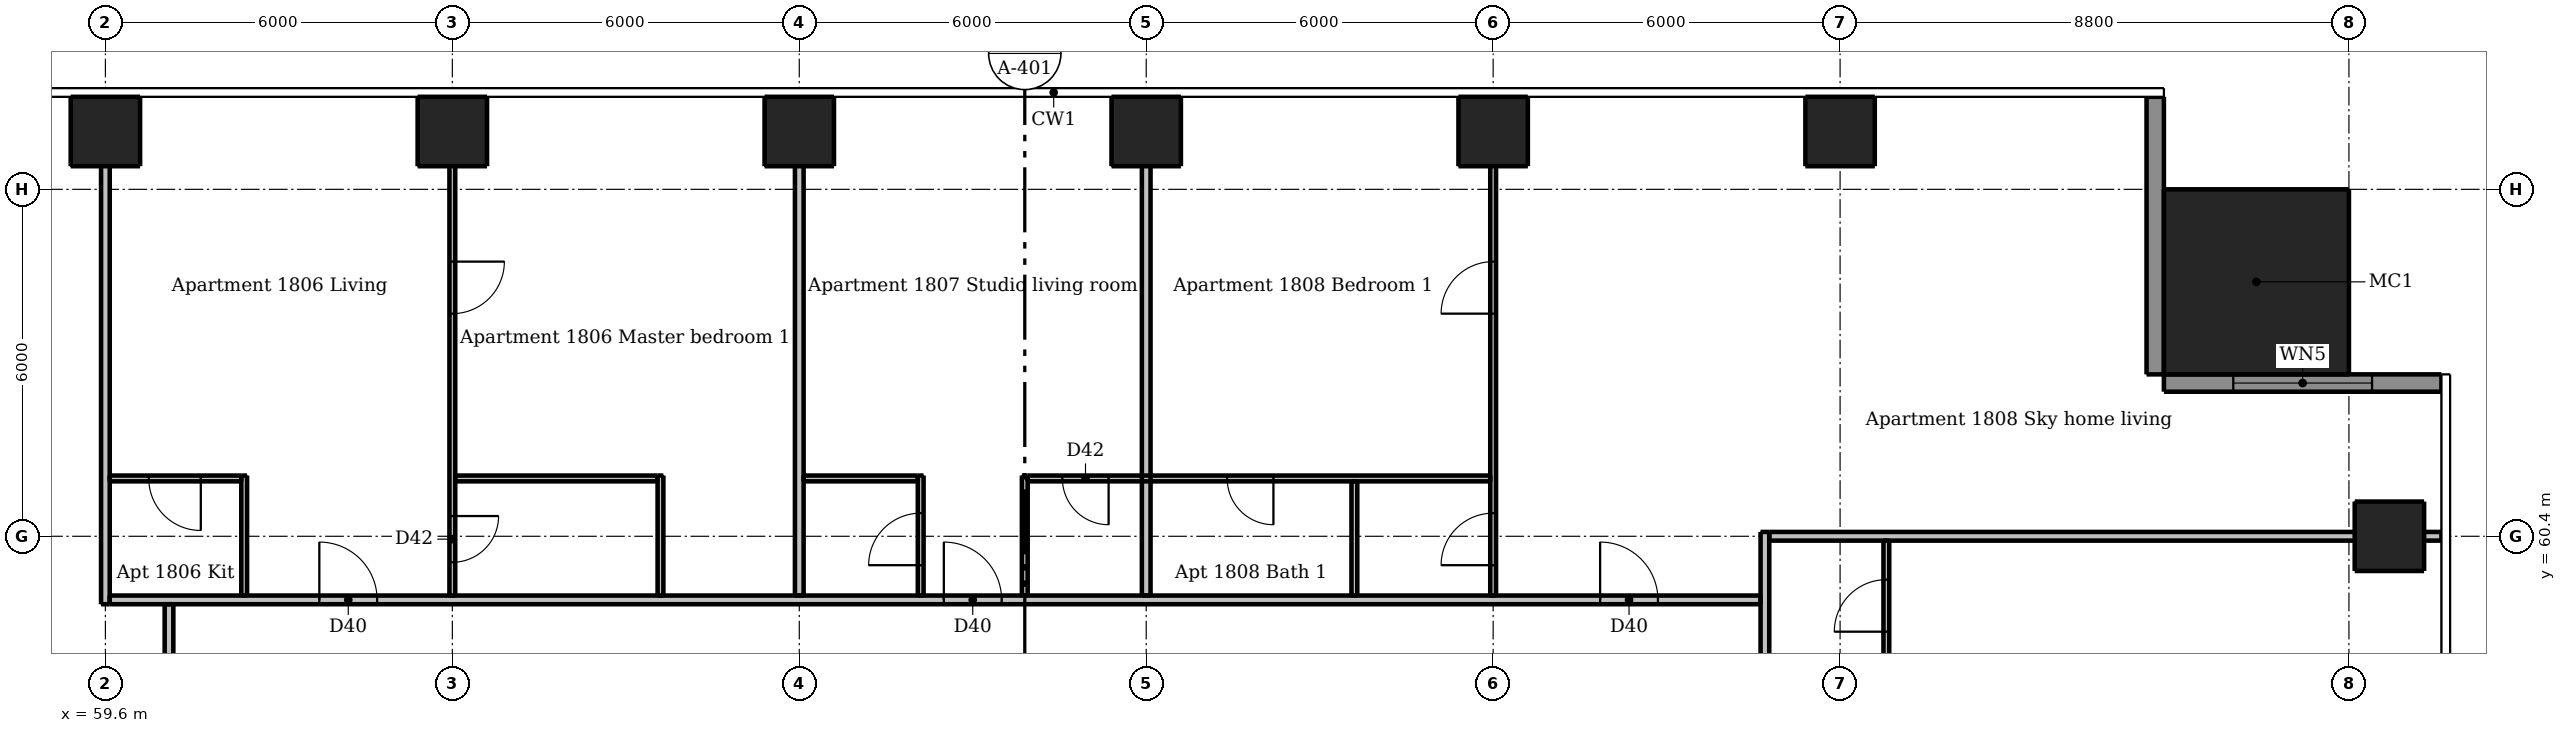
"""IFC4 building model, lengths in metres.
Left out: names, types, materials, properties, quantities, classifications, styles, units other than length and angle.
Written with IfcOpenShell. Run it as: python <this file> out.ifc"""

import sys

from ifc_helpers import new_model, si_unit, direction, frame, frame_2d, origin, origin_2d, place, context, subcontext, project, spatial, rectangle, extrude, element, fill, save


model = new_model("IFC4")
c1 = context("Model", 3, precision=1e-05, world=origin(), true_north=direction((0.0, 1.0)))
c2 = subcontext(c1, "Body", "Model", "MODEL_VIEW")
j1 = project(units=[si_unit("LENGTHUNIT", "METRE"), si_unit("PLANEANGLEUNIT", "RADIAN")], contexts=[c1])
p1 = place(None, origin())
s1 = spatial("IfcSite", under=j1, at=p1, CompositionType="ELEMENT")
p2 = place(p1, origin())
s2 = spatial("IfcBuilding", under=s1, at=p2, CompositionType="ELEMENT")
p3 = place(p2, frame((0.0, 0.0, 66.4)))
s3 = spatial("IfcBuildingStorey", under=s2, at=p3, CompositionType="ELEMENT", Elevation=66.4)
for number, where, z_axis, x_axis in (
    (1, (99.1, 60.4, 0.0), (0.0, 0.0, 1.0), (1.0, 0.0, 0.0)),
    (2, (59.6, 67.4, 0.0), (0.0, 0.0, 1.0), (1.0, 0.0, 0.0)),
    (3, (65.6, 67.4, 0.0), (0.0, 0.0, 1.0), (1.0, 0.0, 0.0)),
    (4, (71.6, 67.4, 0.0), (0.0, 0.0, 1.0), (1.0, 0.0, 0.0)),
    (5, (77.6, 67.4, 0.0), (0.0, 0.0, 1.0), (1.0, 0.0, 0.0)),
    (6, (83.6, 67.4, 0.0), (0.0, 0.0, 1.0), (1.0, 0.0, 0.0)),
    (7, (89.6, 67.4, 0.0), (0.0, 0.0, 1.0), (1.0, 0.0, 0.0)),
):
    element("IfcColumn", number, at=place(p3, frame(where, z_axis=z_axis, x_axis=x_axis)), inside=s3, PredefinedType="COLUMN", context=c2, shape_type="SweptSolid", body=[
        extrude(rectangle(XDim=1.2, YDim=1.2, at=origin_2d()), origin(), (0.0, 0.0, 1.0), 2.95),
    ])
p4 = place(p3, frame((96.8, 64.8, 0.0), z_axis=(0.0, 0.0, 1.0), x_axis=(1.0, 0.0, 0.0)))
e8 = element("IfcColumn", 8, at=p4, inside=s3, PredefinedType="COLUMN", context=c2, shape_type="SweptSolid", body=[
    extrude(rectangle(XDim=3.2, YDim=3.2, at=origin_2d()), origin(), (0.0, 0.0, 1.0), 3.3),
])
p5 = place(p3, frame((100.0, 63.05, 0.0), z_axis=(0.0, 0.0, 1.0), x_axis=(-1.0, 0.0, 0.0)))
e9 = element("IfcWall", 9, at=p5, inside=s3, PredefinedType="SOLIDWALL", context=c2, shape_type="SweptSolid", body=[
    extrude(rectangle(XDim=4.8, YDim=0.3, at=frame_2d((2.4, 0.0))), origin(), (0.0, 0.0, 1.0), 2.95),
])
p6 = place(p5, frame((1.2, 0.0, 0.15)))
e10 = element("IfcOpeningElement", 10, at=p6, cuts=e9, PredefinedType="OPENING", context=c2, shape_type="SweptSolid", body=[
    extrude(rectangle(XDim=2.4, YDim=2.1, at=frame_2d((1.2, 1.05))), frame((0.0, 0.16, 0.0), z_axis=(0.0, -1.0, 0.0), x_axis=(1.0, 0.0, 0.0)), (0.0, 0.0, 1.0), 0.32),
])
p7 = place(p3, frame((95.05, 63.2, 0.0), z_axis=(0.0, 0.0, 1.0), x_axis=(0.0, 1.0, 0.0)))
e11 = element("IfcWall", 11, at=p7, inside=s3, PredefinedType="SOLIDWALL", context=c2, shape_type="SweptSolid", body=[
    extrude(rectangle(XDim=4.8, YDim=0.3, at=frame_2d((2.4, 0.0))), origin(), (0.0, 0.0, 1.0), 2.95),
])
p8 = place(p3, frame((62.0, 59.375, 0.0), z_axis=(0.0, 0.0, 1.0), x_axis=(0.0, 1.0, 0.0)))
e12 = element("IfcWall", 12, at=p8, inside=s3, PredefinedType="PARTITIONING", context=c2, shape_type="SweptSolid", body=[
    extrude(rectangle(XDim=2.075, YDim=0.1, at=frame_2d((1.038, 0.0))), origin(), (0.0, 0.0, 1.0), 2.95),
])
p9 = place(p3, frame((65.6, 68.0, 0.0), z_axis=(0.0, 0.0, 1.0), x_axis=(0.0, -1.0, 0.0)))
e13 = element("IfcWall", 13, at=p9, inside=s3, PredefinedType="PARTITIONING", context=c2, shape_type="SweptSolid", body=[
    extrude(rectangle(XDim=8.625, YDim=0.1, at=frame_2d((4.312, 0.0))), origin(), (0.0, 0.0, 1.0), 2.332),
])
p10 = place(p9, frame((2.85, 0.0, 0.0)))
e14 = element("IfcOpeningElement", 14, at=p10, cuts=e13, PredefinedType="OPENING", context=c2, shape_type="SweptSolid", body=[
    extrude(rectangle(XDim=0.9, YDim=2.1, at=frame_2d((0.45, 1.05))), frame((0.0, 0.06, 0.0), z_axis=(0.0, -1.0, 0.0), x_axis=(1.0, 0.0, 0.0)), (0.0, 0.0, 1.0), 0.12),
])
p11 = place(p9, frame((7.25, 0.0, 0.0)))
e15 = element("IfcOpeningElement", 15, at=p11, cuts=e13, PredefinedType="OPENING", context=c2, shape_type="SweptSolid", body=[
    extrude(rectangle(XDim=0.8, YDim=2.1, at=frame_2d((0.4, 1.05))), frame((0.0, 0.06, 0.0), z_axis=(0.0, -1.0, 0.0), x_axis=(1.0, 0.0, 0.0)), (0.0, 0.0, 1.0), 0.12),
])
p12 = place(p3, frame((69.2, 59.375, 0.0), z_axis=(0.0, 0.0, 1.0), x_axis=(0.0, 1.0, 0.0)))
e16 = element("IfcWall", 16, at=p12, inside=s3, PredefinedType="PARTITIONING", context=c2, shape_type="SweptSolid", body=[
    extrude(rectangle(XDim=2.075, YDim=0.1, at=frame_2d((1.038, 0.0))), origin(), (0.0, 0.0, 1.0), 2.95),
])
p13 = place(p3, frame((73.7, 59.375, 0.0), z_axis=(0.0, 0.0, 1.0), x_axis=(0.0, 1.0, 0.0)))
e17 = element("IfcWall", 17, at=p13, inside=s3, PredefinedType="PARTITIONING", context=c2, shape_type="SweptSolid", body=[
    extrude(rectangle(XDim=2.075, YDim=0.1, at=frame_2d((1.038, 0.0))), origin(), (0.0, 0.0, 1.0), 2.95),
])
p14 = place(p13, frame((0.525, 0.0, 0.0)))
e18 = element("IfcOpeningElement", 18, at=p14, cuts=e17, PredefinedType="OPENING", context=c2, shape_type="SweptSolid", body=[
    extrude(rectangle(XDim=0.9, YDim=2.1, at=frame_2d((0.45, 1.05))), frame((0.0, 0.06, 0.0), z_axis=(0.0, -1.0, 0.0), x_axis=(1.0, 0.0, 0.0)), (0.0, 0.0, 1.0), 0.12),
])
p15 = place(p3, frame((75.5, 59.375, 0.0), z_axis=(0.0, 0.0, 1.0), x_axis=(0.0, 1.0, 0.0)))
e19 = element("IfcWall", 19, at=p15, inside=s3, PredefinedType="PARTITIONING", context=c2, shape_type="SweptSolid", body=[
    extrude(rectangle(XDim=2.075, YDim=0.1, at=frame_2d((1.038, 0.0))), origin(), (0.0, 0.0, 1.0), 2.95),
])
p16 = place(p3, frame((81.2, 59.375, 0.0), z_axis=(0.0, 0.0, 1.0), x_axis=(0.0, 1.0, 0.0)))
e20 = element("IfcWall", 20, at=p16, inside=s3, PredefinedType="PARTITIONING", context=c2, shape_type="SweptSolid", body=[
    extrude(rectangle(XDim=1.975, YDim=0.1, at=frame_2d((0.988, 0.0))), origin(), (0.0, 0.0, 1.0), 2.95),
])
p17 = place(p3, frame((83.6, 59.375, 0.0), z_axis=(0.0, 0.0, 1.0), x_axis=(0.0, 1.0, 0.0)))
e21 = element("IfcWall", 21, at=p17, inside=s3, PredefinedType="PARTITIONING", context=c2, shape_type="SweptSolid", body=[
    extrude(rectangle(XDim=8.625, YDim=0.1, at=frame_2d((4.312, 0.0))), origin(), (0.0, 0.0, 1.0), 2.332),
])
p18 = place(p17, frame((0.525, 0.0, 0.0)))
e22 = element("IfcOpeningElement", 22, at=p18, cuts=e21, PredefinedType="OPENING", context=c2, shape_type="SweptSolid", body=[
    extrude(rectangle(XDim=0.9, YDim=2.1, at=frame_2d((0.45, 1.05))), frame((0.0, 0.06, 0.0), z_axis=(0.0, -1.0, 0.0), x_axis=(1.0, 0.0, 0.0)), (0.0, 0.0, 1.0), 0.12),
])
p19 = place(p17, frame((4.875, 0.0, 0.0)))
e23 = element("IfcOpeningElement", 23, at=p19, cuts=e21, PredefinedType="OPENING", context=c2, shape_type="SweptSolid", body=[
    extrude(rectangle(XDim=0.9, YDim=2.1, at=frame_2d((0.45, 1.05))), frame((0.0, 0.06, 0.0), z_axis=(0.0, -1.0, 0.0), x_axis=(1.0, 0.0, 0.0)), (0.0, 0.0, 1.0), 0.12),
])
p20 = place(p3, frame((90.4, 57.95, 0.0), z_axis=(0.0, 0.0, 1.0), x_axis=(0.0, 1.0, 0.0)))
e24 = element("IfcWall", 24, at=p20, inside=s3, PredefinedType="PARTITIONING", context=c2, shape_type="SweptSolid", body=[
    extrude(rectangle(XDim=2.375, YDim=0.1, at=frame_2d((1.188, 0.0))), origin(), (0.0, 0.0, 1.0), 2.95),
])
p21 = place(p20, frame((0.8, 0.0, 0.0)))
e25 = element("IfcOpeningElement", 25, at=p21, cuts=e24, PredefinedType="OPENING", context=c2, shape_type="SweptSolid", body=[
    extrude(rectangle(XDim=0.9, YDim=2.1, at=frame_2d((0.45, 1.05))), frame((0.0, 0.06, 0.0), z_axis=(0.0, -1.0, 0.0), x_axis=(1.0, 0.0, 0.0)), (0.0, 0.0, 1.0), 0.12),
])
p22 = place(p3, frame((61.95, 61.4, 0.0), z_axis=(0.0, 0.0, 1.0), x_axis=(-1.0, 0.0, 0.0)))
e26 = element("IfcWall", 26, at=p22, inside=s3, PredefinedType="PARTITIONING", context=c2, shape_type="SweptSolid", body=[
    extrude(rectangle(XDim=2.275, YDim=0.1, at=frame_2d((1.137, 0.0))), origin(), (0.0, 0.0, 1.0), 2.95),
])
p23 = place(p22, frame((0.7, 0.0, 0.0)))
e27 = element("IfcOpeningElement", 27, at=p23, cuts=e26, PredefinedType="OPENING", context=c2, shape_type="SweptSolid", body=[
    extrude(rectangle(XDim=0.9, YDim=2.1, at=frame_2d((0.45, 1.05))), frame((0.0, 0.06, 0.0), z_axis=(0.0, -1.0, 0.0), x_axis=(1.0, 0.0, 0.0)), (0.0, 0.0, 1.0), 0.12),
])
p24 = place(p3, frame((65.65, 61.4, 0.0), z_axis=(0.0, 0.0, 1.0), x_axis=(1.0, 0.0, 0.0)))
e28 = element("IfcWall", 28, at=p24, inside=s3, PredefinedType="PARTITIONING", context=c2, shape_type="SweptSolid", body=[
    extrude(rectangle(XDim=3.5, YDim=0.1, at=frame_2d((1.75, 0.0))), origin(), (0.0, 0.0, 1.0), 2.95),
])
p25 = place(p3, frame((71.675, 61.4, 0.0), z_axis=(0.0, 0.0, 1.0), x_axis=(1.0, 0.0, 0.0)))
e29 = element("IfcWall", 29, at=p25, inside=s3, PredefinedType="PARTITIONING", context=c2, shape_type="SweptSolid", body=[
    extrude(rectangle(XDim=1.975, YDim=0.1, at=frame_2d((0.987, 0.0))), origin(), (0.0, 0.0, 1.0), 2.95),
])
p26 = place(p3, frame((83.55, 61.4, 0.0), z_axis=(0.0, 0.0, 1.0), x_axis=(-1.0, 0.0, 0.0)))
e30 = element("IfcWall", 30, at=p26, inside=s3, PredefinedType="PARTITIONING", context=c2, shape_type="SweptSolid", body=[
    extrude(rectangle(XDim=8.0, YDim=0.1, at=frame_2d((4.0, 0.0))), origin(), (0.0, 0.0, 1.0), 2.95),
])
p27 = place(p26, frame((6.6, 0.0, 0.0)))
e31 = element("IfcOpeningElement", 31, at=p27, cuts=e30, PredefinedType="OPENING", context=c2, shape_type="SweptSolid", body=[
    extrude(rectangle(XDim=0.8, YDim=2.1, at=frame_2d((0.4, 1.05))), frame((0.0, 0.06, 0.0), z_axis=(0.0, -1.0, 0.0), x_axis=(1.0, 0.0, 0.0)), (0.0, 0.0, 1.0), 0.12),
])
p28 = place(p26, frame((3.75, 0.0, 0.0)))
e32 = element("IfcOpeningElement", 32, at=p28, cuts=e30, PredefinedType="OPENING", context=c2, shape_type="SweptSolid", body=[
    extrude(rectangle(XDim=0.8, YDim=2.1, at=frame_2d((0.4, 1.05))), frame((0.0, 0.06, 0.0), z_axis=(0.0, -1.0, 0.0), x_axis=(1.0, 0.0, 0.0)), (0.0, 0.0, 1.0), 0.12),
])
p29 = place(p3, frame((59.6, 59.225, 0.0), z_axis=(0.0, 0.0, 1.0), x_axis=(0.0, 1.0, 0.0)))
e33 = element("IfcWall", 33, at=p29, inside=s3, PredefinedType="PARTITIONING", context=c2, shape_type="SweptSolid", body=[
    extrude(rectangle(XDim=8.775, YDim=0.15, at=frame_2d((4.387, 0.0))), origin(), (0.0, 0.0, 1.0), 2.332),
])
p30 = place(p3, frame((60.7, 30.325, 0.0), z_axis=(0.0, 0.0, 1.0), x_axis=(0.0, 1.0, 0.0)))
e34 = element("IfcWall", 34, at=p30, inside=s3, PredefinedType="PARTITIONING", context=c2, shape_type="SweptSolid", body=[
    extrude(rectangle(XDim=28.9, YDim=0.15, at=frame_2d((14.45, 0.0))), origin(), (0.0, 0.0, 1.0), 2.95),
])
p31 = place(p30, frame((7.375, 0.0, 0.0)))
e35 = element("IfcOpeningElement", 35, at=p31, cuts=e34, PredefinedType="OPENING", context=c2, shape_type="SweptSolid", body=[
    extrude(rectangle(XDim=1.0, YDim=2.1, at=frame_2d((0.5, 1.05))), frame((0.0, 0.085, 0.0), z_axis=(0.0, -1.0, 0.0), x_axis=(1.0, 0.0, 0.0)), (0.0, 0.0, 1.0), 0.17),
])
p32 = place(p30, frame((14.575, 0.0, 0.0)))
e36 = element("IfcOpeningElement", 36, at=p32, cuts=e34, PredefinedType="OPENING", context=c2, shape_type="SweptSolid", body=[
    extrude(rectangle(XDim=1.0, YDim=2.1, at=frame_2d((0.5, 1.05))), frame((0.0, 0.085, 0.0), z_axis=(0.0, -1.0, 0.0), x_axis=(1.0, 0.0, 0.0)), (0.0, 0.0, 1.0), 0.17),
])
p33 = place(p30, frame((26.025, 0.0, 0.0)))
e37 = element("IfcOpeningElement", 37, at=p33, cuts=e34, PredefinedType="OPENING", context=c2, shape_type="SweptSolid", body=[
    extrude(rectangle(XDim=1.0, YDim=2.1, at=frame_2d((0.5, 1.05))), frame((0.0, 0.085, 0.0), z_axis=(0.0, -1.0, 0.0), x_axis=(1.0, 0.0, 0.0)), (0.0, 0.0, 1.0), 0.17),
])
for number, where, z_axis, x_axis in (
    (38, (71.6, 59.375, 0.0), (0.0, 0.0, 1.0), (0.0, 1.0, 0.0)),
    (39, (77.6, 59.375, 0.0), (0.0, 0.0, 1.0), (0.0, 1.0, 0.0)),
):
    element("IfcWall", number, at=place(p3, frame(where, z_axis=z_axis, x_axis=x_axis)), inside=s3, PredefinedType="PARTITIONING", context=c2, shape_type="SweptSolid", body=[
        extrude(rectangle(XDim=8.625, YDim=0.15, at=frame_2d((4.312, 0.0))), origin(), (0.0, 0.0, 1.0), 2.332),
    ])
p34 = place(p3, frame((88.3, 60.475, 0.0), z_axis=(0.0, 0.0, 1.0), x_axis=(0.0, -1.0, 0.0)))
e40 = element("IfcWall", 40, at=p34, inside=s3, PredefinedType="PARTITIONING", context=c2, shape_type="SweptSolid", body=[
    extrude(rectangle(XDim=28.7, YDim=0.15, at=frame_2d((14.35, 0.0))), origin(), (0.0, 0.0, 1.0), 2.95),
])
p35 = place(p34, frame((27.425, 0.0, 0.0)))
e41 = element("IfcOpeningElement", 41, at=p35, cuts=e40, PredefinedType="OPENING", context=c2, shape_type="SweptSolid", body=[
    extrude(rectangle(XDim=1.0, YDim=2.1, at=frame_2d((0.5, 1.05))), frame((0.0, 0.085, 0.0), z_axis=(0.0, -1.0, 0.0), x_axis=(1.0, 0.0, 0.0)), (0.0, 0.0, 1.0), 0.17),
])
p36 = place(p34, frame((14.525, 0.0, 0.0)))
e42 = element("IfcOpeningElement", 42, at=p36, cuts=e40, PredefinedType="OPENING", context=c2, shape_type="SweptSolid", body=[
    extrude(rectangle(XDim=1.0, YDim=2.1, at=frame_2d((0.5, 1.05))), frame((0.0, 0.085, 0.0), z_axis=(0.0, -1.0, 0.0), x_axis=(1.0, 0.0, 0.0)), (0.0, 0.0, 1.0), 0.17),
])
p37 = place(p34, frame((3.775, 0.0, 0.0)))
e43 = element("IfcOpeningElement", 43, at=p37, cuts=e40, PredefinedType="OPENING", context=c2, shape_type="SweptSolid", body=[
    extrude(rectangle(XDim=1.0, YDim=2.1, at=frame_2d((0.5, 1.05))), frame((0.0, 0.085, 0.0), z_axis=(0.0, -1.0, 0.0), x_axis=(1.0, 0.0, 0.0)), (0.0, 0.0, 1.0), 0.17),
])
p38 = place(p3, frame((88.375, 60.4, 0.0), z_axis=(0.0, 0.0, 1.0), x_axis=(1.0, 0.0, 0.0)))
e44 = element("IfcWall", 44, at=p38, inside=s3, PredefinedType="PARTITIONING", context=c2, shape_type="SweptSolid", body=[
    extrude(rectangle(XDim=11.625, YDim=0.15, at=frame_2d((5.812, 0.0))), origin(), (0.0, 0.0, 1.0), 2.332),
])
p39 = place(p3, frame((59.675, 59.3, 0.0), z_axis=(0.0, 0.0, 1.0), x_axis=(1.0, 0.0, 0.0)))
e45 = element("IfcWall", 45, at=p39, inside=s3, PredefinedType="PARTITIONING", context=c2, shape_type="SweptSolid", body=[
    extrude(rectangle(XDim=28.55, YDim=0.15, at=frame_2d((14.275, 0.0))), origin(), (0.0, 0.0, 1.0), 2.95),
])
p40 = place(p39, frame((3.625, 0.0, 0.0)))
e46 = element("IfcOpeningElement", 46, at=p40, cuts=e45, PredefinedType="OPENING", context=c2, shape_type="SweptSolid", body=[
    extrude(rectangle(XDim=1.0, YDim=2.1, at=frame_2d((0.5, 1.05))), frame((0.0, 0.085, 0.0), z_axis=(0.0, -1.0, 0.0), x_axis=(1.0, 0.0, 0.0)), (0.0, 0.0, 1.0), 0.17),
])
p41 = place(p39, frame((14.425, 0.0, 0.0)))
e47 = element("IfcOpeningElement", 47, at=p41, cuts=e45, PredefinedType="OPENING", context=c2, shape_type="SweptSolid", body=[
    extrude(rectangle(XDim=1.0, YDim=2.1, at=frame_2d((0.5, 1.05))), frame((0.0, 0.085, 0.0), z_axis=(0.0, -1.0, 0.0), x_axis=(1.0, 0.0, 0.0)), (0.0, 0.0, 1.0), 0.17),
])
p42 = place(p39, frame((25.775, 0.0, 0.0)))
e48 = element("IfcOpeningElement", 48, at=p42, cuts=e45, PredefinedType="OPENING", context=c2, shape_type="SweptSolid", body=[
    extrude(rectangle(XDim=1.0, YDim=2.1, at=frame_2d((0.5, 1.05))), frame((0.0, 0.085, 0.0), z_axis=(0.0, -1.0, 0.0), x_axis=(1.0, 0.0, 0.0)), (0.0, 0.0, 1.0), 0.17),
])
p43 = place(p6, origin())
e49 = element("IfcWindow", 49, at=p43, inside=s3, PartitioningType="DOUBLE_PANEL_VERTICAL", PredefinedType="WINDOW", context=c2, shape_type="SweptSolid", body=[
    extrude(rectangle(XDim=2.4, YDim=2.1, at=frame_2d((1.2, 1.05))), frame((0.0, 0.03, 0.0), z_axis=(0.0, -1.0, 0.0), x_axis=(1.0, 0.0, 0.0)), (0.0, 0.0, 1.0), 0.06),
])
fill(e10, e49)
p44 = place(p21, origin())
e50 = element("IfcDoor", 50, at=p44, inside=s3, OperationType="SINGLE_SWING_LEFT", PredefinedType="DOOR", context=c2, shape_type="SweptSolid", body=[
    extrude(rectangle(XDim=0.9, YDim=2.1, at=frame_2d((0.45, 1.05))), frame((0.0, 0.025, 0.0), z_axis=(0.0, -1.0, 0.0), x_axis=(1.0, 0.0, 0.0)), (0.0, 0.0, 1.0), 0.05),
])
fill(e25, e50)
p45 = place(p40, origin())
e51 = element("IfcDoor", 51, at=p45, inside=s3, OperationType="SINGLE_SWING_LEFT", PredefinedType="DOOR", context=c2, shape_type="SweptSolid", body=[
    extrude(rectangle(XDim=1.0, YDim=2.1, at=frame_2d((0.5, 1.05))), frame((0.0, 0.025, 0.0), z_axis=(0.0, -1.0, 0.0), x_axis=(1.0, 0.0, 0.0)), (0.0, 0.0, 1.0), 0.05),
])
fill(e46, e51)
p46 = place(p23, origin())
e52 = element("IfcDoor", 52, at=p46, inside=s3, OperationType="SINGLE_SWING_LEFT", PredefinedType="DOOR", context=c2, shape_type="SweptSolid", body=[
    extrude(rectangle(XDim=0.9, YDim=2.1, at=frame_2d((0.45, 1.05))), frame((0.0, 0.025, 0.0), z_axis=(0.0, -1.0, 0.0), x_axis=(1.0, 0.0, 0.0)), (0.0, 0.0, 1.0), 0.05),
])
fill(e27, e52)
p47 = place(p10, origin())
e53 = element("IfcDoor", 53, at=p47, inside=s3, OperationType="SINGLE_SWING_LEFT", PredefinedType="DOOR", context=c2, shape_type="SweptSolid", body=[
    extrude(rectangle(XDim=0.9, YDim=2.1, at=frame_2d((0.45, 1.05))), frame((0.0, 0.025, 0.0), z_axis=(0.0, -1.0, 0.0), x_axis=(1.0, 0.0, 0.0)), (0.0, 0.0, 1.0), 0.05),
])
fill(e14, e53)
p48 = place(p11, origin())
e54 = element("IfcDoor", 54, at=p48, inside=s3, OperationType="SINGLE_SWING_LEFT", PredefinedType="DOOR", context=c2, shape_type="SweptSolid", body=[
    extrude(rectangle(XDim=0.8, YDim=2.1, at=frame_2d((0.4, 1.05))), frame((0.0, 0.025, 0.0), z_axis=(0.0, -1.0, 0.0), x_axis=(1.0, 0.0, 0.0)), (0.0, 0.0, 1.0), 0.05),
])
fill(e15, e54)
p49 = place(p41, origin())
e55 = element("IfcDoor", 55, at=p49, inside=s3, OperationType="SINGLE_SWING_LEFT", PredefinedType="DOOR", context=c2, shape_type="SweptSolid", body=[
    extrude(rectangle(XDim=1.0, YDim=2.1, at=frame_2d((0.5, 1.05))), frame((0.0, 0.025, 0.0), z_axis=(0.0, -1.0, 0.0), x_axis=(1.0, 0.0, 0.0)), (0.0, 0.0, 1.0), 0.05),
])
fill(e47, e55)
p50 = place(p14, origin())
e56 = element("IfcDoor", 56, at=p50, inside=s3, OperationType="SINGLE_SWING_LEFT", PredefinedType="DOOR", context=c2, shape_type="SweptSolid", body=[
    extrude(rectangle(XDim=0.9, YDim=2.1, at=frame_2d((0.45, 1.05))), frame((0.0, 0.025, 0.0), z_axis=(0.0, -1.0, 0.0), x_axis=(1.0, 0.0, 0.0)), (0.0, 0.0, 1.0), 0.05),
])
fill(e18, e56)
p51 = place(p27, origin())
e57 = element("IfcDoor", 57, at=p51, inside=s3, OperationType="SINGLE_SWING_LEFT", PredefinedType="DOOR", context=c2, shape_type="SweptSolid", body=[
    extrude(rectangle(XDim=0.8, YDim=2.1, at=frame_2d((0.4, 1.05))), frame((0.0, 0.025, 0.0), z_axis=(0.0, -1.0, 0.0), x_axis=(1.0, 0.0, 0.0)), (0.0, 0.0, 1.0), 0.05),
])
fill(e31, e57)
p52 = place(p42, origin())
e58 = element("IfcDoor", 58, at=p52, inside=s3, OperationType="SINGLE_SWING_LEFT", PredefinedType="DOOR", context=c2, shape_type="SweptSolid", body=[
    extrude(rectangle(XDim=1.0, YDim=2.1, at=frame_2d((0.5, 1.05))), frame((0.0, 0.025, 0.0), z_axis=(0.0, -1.0, 0.0), x_axis=(1.0, 0.0, 0.0)), (0.0, 0.0, 1.0), 0.05),
])
fill(e48, e58)
p53 = place(p18, origin())
e59 = element("IfcDoor", 59, at=p53, inside=s3, OperationType="SINGLE_SWING_LEFT", PredefinedType="DOOR", context=c2, shape_type="SweptSolid", body=[
    extrude(rectangle(XDim=0.9, YDim=2.1, at=frame_2d((0.45, 1.05))), frame((0.0, 0.025, 0.0), z_axis=(0.0, -1.0, 0.0), x_axis=(1.0, 0.0, 0.0)), (0.0, 0.0, 1.0), 0.05),
])
fill(e22, e59)
p54 = place(p19, origin())
e60 = element("IfcDoor", 60, at=p54, inside=s3, OperationType="SINGLE_SWING_LEFT", PredefinedType="DOOR", context=c2, shape_type="SweptSolid", body=[
    extrude(rectangle(XDim=0.9, YDim=2.1, at=frame_2d((0.45, 1.05))), frame((0.0, 0.025, 0.0), z_axis=(0.0, -1.0, 0.0), x_axis=(1.0, 0.0, 0.0)), (0.0, 0.0, 1.0), 0.05),
])
fill(e23, e60)
p55 = place(p28, origin())
e61 = element("IfcDoor", 61, at=p55, inside=s3, OperationType="SINGLE_SWING_LEFT", PredefinedType="DOOR", context=c2, shape_type="SweptSolid", body=[
    extrude(rectangle(XDim=0.8, YDim=2.1, at=frame_2d((0.4, 1.05))), frame((0.0, 0.025, 0.0), z_axis=(0.0, -1.0, 0.0), x_axis=(1.0, 0.0, 0.0)), (0.0, 0.0, 1.0), 0.05),
])
fill(e32, e61)
save(model, sys.argv[1])
